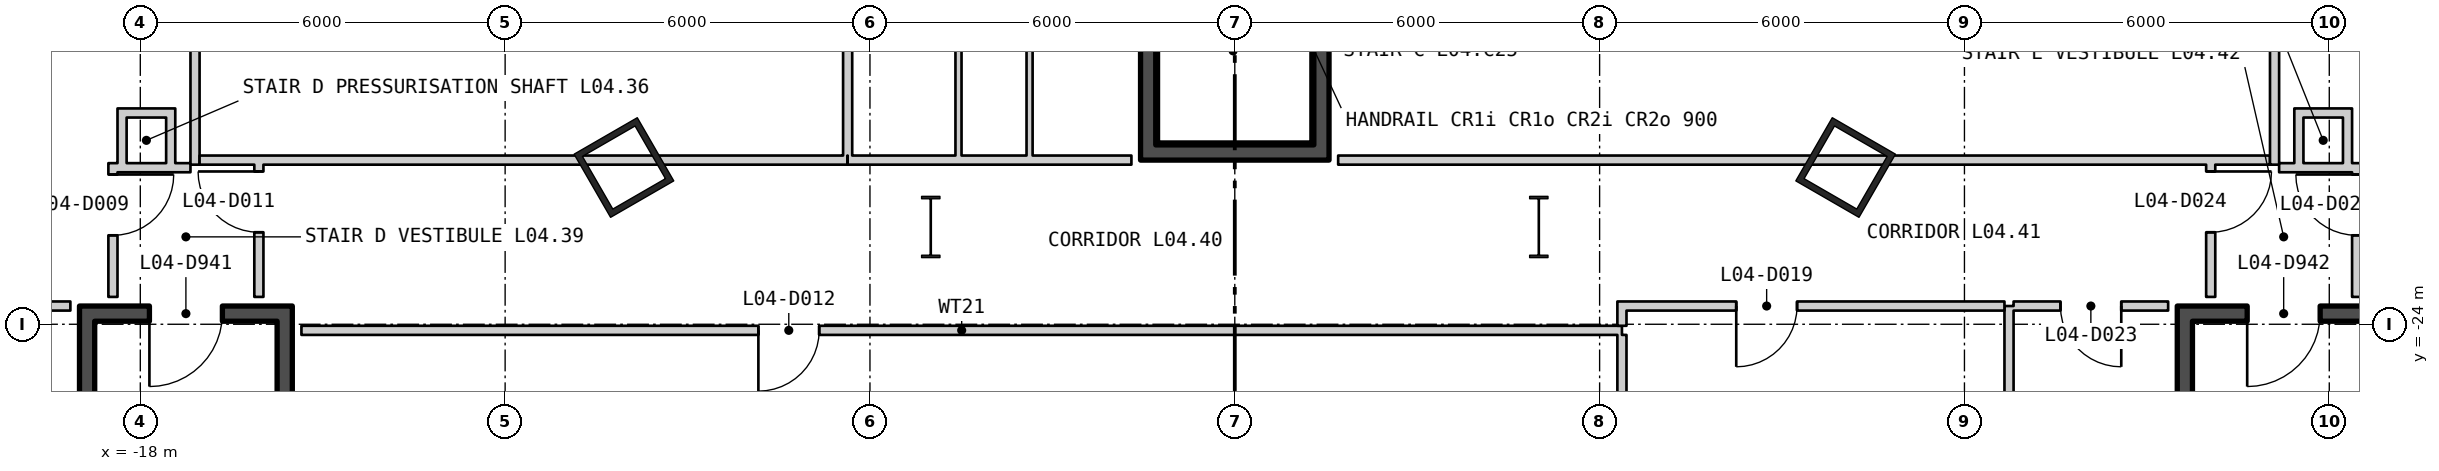
"""IFC4 building model, lengths in metres.
Left out: names, types, materials, properties, quantities, classifications, styles, units other than length and angle.
Written with IfcOpenShell. Run it as: python <this file> out.ifc"""

import sys

from ifc_helpers import new_model, si_unit, direction, frame, frame_2d, origin, origin_2d, place, context, subcontext, project, spatial, rectangle, hollow_rectangle, i_section, extrude, element, fill, save


model = new_model("IFC4")
c1 = context("Model", 3, precision=1e-05, world=origin(), true_north=direction((0.0, 1.0)))
c2 = subcontext(c1, "Body", "Model", "MODEL_VIEW")
j1 = project(units=[si_unit("LENGTHUNIT", "METRE"), si_unit("PLANEANGLEUNIT", "RADIAN")], contexts=[c1])
p1 = place(None, origin())
s1 = spatial("IfcSite", under=j1, at=p1, CompositionType="ELEMENT")
p2 = place(p1, origin())
s2 = spatial("IfcBuilding", under=s1, at=p2, CompositionType="ELEMENT")
p3 = place(p2, frame((0.0, 0.0, 23.7)))
s3 = spatial("IfcBuildingStorey", under=s2, at=p3, CompositionType="ELEMENT", Elevation=23.7)
for number, where, z_axis, x_axis in (
    (1, (-10.046, -21.422, 0.0), (0.0, 0.0, 1.0), (0.5, -0.866, 0.0)),
    (2, (10.046, -21.422, 0.0), (0.0, 0.0, 1.0), (0.5, 0.866, 0.0)),
):
    element("IfcColumn", number, at=place(p3, frame(where, z_axis=z_axis, x_axis=x_axis)), inside=s3, PredefinedType="COLUMN", context=c2, shape_type="SweptSolid", body=[
        extrude(hollow_rectangle(XDim=1.2, YDim=1.2, WallThickness=0.1, at=origin_2d()), origin(), (0.0, 0.0, 1.0), 5.1),
    ])
for number, where, z_axis, x_axis in (
    (3, (5.0, -22.4, 0.0), (0.0, 0.0, 1.0), (1.0, 0.0, 0.0)),
    (4, (-5.0, -22.4, 0.0), (0.0, 0.0, 1.0), (1.0, 0.0, 0.0)),
):
    element("IfcColumn", number, at=place(p3, frame(where, z_axis=z_axis, x_axis=x_axis)), inside=s3, PredefinedType="COLUMN", context=c2, shape_type="SweptSolid", body=[
        extrude(i_section(OverallWidth=0.302, OverallDepth=1.008, WebThickness=0.021, FlangeThickness=0.04, at=origin_2d()), origin(), (0.0, 0.0, 1.0), 5.1),
    ])
p4 = place(p3, frame((-1.425, -21.05, 0.0), z_axis=(0.0, 0.0, 1.0), x_axis=(0.0, 1.0, 0.0)))
e5 = element("IfcWall", 5, at=p4, inside=s3, PredefinedType="SHEAR", context=c2, shape_type="SweptSolid", body=[
    extrude(rectangle(XDim=7.2, YDim=0.25, at=frame_2d((3.6, 0.0))), origin(), (0.0, 0.0, 1.0), 4.85),
])
p5 = place(p3, frame((1.425, -21.05, 0.0), z_axis=(0.0, 0.0, 1.0), x_axis=(0.0, 1.0, 0.0)))
e6 = element("IfcWall", 6, at=p5, inside=s3, PredefinedType="SHEAR", context=c2, shape_type="SweptSolid", body=[
    extrude(rectangle(XDim=7.2, YDim=0.25, at=frame_2d((3.6, 0.0))), origin(), (0.0, 0.0, 1.0), 4.85),
])
p6 = place(p5, frame((5.89, 0.0, 0.0)))
e7 = element("IfcOpeningElement", 7, at=p6, cuts=e6, PredefinedType="OPENING", context=c2, shape_type="SweptSolid", body=[
    extrude(rectangle(XDim=1.0, YDim=2.1, at=frame_2d((0.5, 1.05))), frame((0.0, 0.135, 0.0), z_axis=(0.0, -1.0, 0.0), x_axis=(1.0, 0.0, 0.0)), (0.0, 0.0, 1.0), 0.27),
])
p7 = place(p3, frame((-1.55, -21.175, 0.0), z_axis=(0.0, 0.0, 1.0), x_axis=(1.0, 0.0, 0.0)))
e8 = element("IfcWall", 8, at=p7, inside=s3, PredefinedType="SHEAR", context=c2, shape_type="SweptSolid", body=[
    extrude(rectangle(XDim=3.1, YDim=0.25, at=frame_2d((1.55, 0.0))), origin(), (0.0, 0.0, 1.0), 4.85),
])
for number, where, z_axis, x_axis in (
    (9, (-18.875, -31.25, 0.0), (0.0, 0.0, 1.0), (0.0, 1.0, 0.0)),
    (10, (-15.625, -31.25, 0.0), (0.0, 0.0, 1.0), (0.0, 1.0, 0.0)),
):
    element("IfcWall", number, at=place(p3, frame(where, z_axis=z_axis, x_axis=x_axis)), inside=s3, PredefinedType="SHEAR", context=c2, shape_type="SweptSolid", body=[
        extrude(rectangle(XDim=7.3, YDim=0.25, at=frame_2d((3.65, 0.0))), origin(), (0.0, 0.0, 1.0), 4.85),
    ])
p8 = place(p3, frame((-19.0, -23.825, 0.0), z_axis=(0.0, 0.0, 1.0), x_axis=(1.0, 0.0, 0.0)))
e11 = element("IfcWall", 11, at=p8, inside=s3, PredefinedType="SHEAR", context=c2, shape_type="SweptSolid", body=[
    extrude(rectangle(XDim=3.5, YDim=0.25, at=frame_2d((1.75, 0.0))), origin(), (0.0, 0.0, 1.0), 4.85),
])
p9 = place(p8, frame((1.15, 0.0, 0.0)))
e12 = element("IfcOpeningElement", 12, at=p9, cuts=e11, PredefinedType="OPENING", context=c2, shape_type="SweptSolid", body=[
    extrude(rectangle(XDim=1.2, YDim=2.1, at=frame_2d((0.6, 1.05))), frame((0.0, 0.135, 0.0), z_axis=(0.0, -1.0, 0.0), x_axis=(1.0, 0.0, 0.0)), (0.0, 0.0, 1.0), 0.27),
])
p10 = place(p3, frame((15.625, -31.25, 0.0), z_axis=(0.0, 0.0, 1.0), x_axis=(0.0, 1.0, 0.0)))
e13 = element("IfcWall", 13, at=p10, inside=s3, PredefinedType="SHEAR", context=c2, shape_type="SweptSolid", body=[
    extrude(rectangle(XDim=7.3, YDim=0.25, at=frame_2d((3.65, 0.0))), origin(), (0.0, 0.0, 1.0), 4.85),
])
p11 = place(p3, frame((15.5, -23.825, 0.0), z_axis=(0.0, 0.0, 1.0), x_axis=(1.0, 0.0, 0.0)))
e14 = element("IfcWall", 14, at=p11, inside=s3, PredefinedType="SHEAR", context=c2, shape_type="SweptSolid", body=[
    extrude(rectangle(XDim=3.5, YDim=0.25, at=frame_2d((1.75, 0.0))), origin(), (0.0, 0.0, 1.0), 4.85),
])
p12 = place(p11, frame((1.15, 0.0, 0.0)))
e15 = element("IfcOpeningElement", 15, at=p12, cuts=e14, PredefinedType="OPENING", context=c2, shape_type="SweptSolid", body=[
    extrude(rectangle(XDim=1.2, YDim=2.1, at=frame_2d((0.6, 1.05))), frame((0.0, 0.135, 0.0), z_axis=(0.0, -1.0, 0.0), x_axis=(1.0, 0.0, 0.0)), (0.0, 0.0, 1.0), 0.27),
])
p13 = place(p3, frame((-19.825, -23.7, 0.0), z_axis=(0.0, 0.0, 1.0), x_axis=(1.0, 0.0, 0.0)))
e16 = element("IfcWall", 16, at=p13, inside=s3, PredefinedType="PARTITIONING", context=c2, shape_type="SweptSolid", body=[
    extrude(rectangle(XDim=0.675, YDim=0.15, at=frame_2d((0.338, 0.0))), origin(), (0.0, 0.0, 1.0), 4.85),
])
p14 = place(p3, frame((-18.45, -23.55, 0.0), z_axis=(0.0, 0.0, 1.0), x_axis=(0.0, 1.0, 0.0)))
e17 = element("IfcWall", 17, at=p14, inside=s3, PredefinedType="PARTITIONING", context=c2, shape_type="SweptSolid", body=[
    extrude(rectangle(XDim=2.2, YDim=0.15, at=frame_2d((1.1, 0.0))), origin(), (0.0, 0.0, 1.0), 4.85),
])
p15 = place(p14, frame((1.013, 0.0, 0.0)))
e18 = element("IfcOpeningElement", 18, at=p15, cuts=e17, PredefinedType="OPENING", context=c2, shape_type="SweptSolid", body=[
    extrude(rectangle(XDim=1.0, YDim=2.1, at=frame_2d((0.5, 1.05))), frame((0.0, 0.085, 0.0), z_axis=(0.0, -1.0, 0.0), x_axis=(1.0, 0.0, 0.0)), (0.0, 0.0, 1.0), 0.17),
])
p16 = place(p3, frame((-18.3, -21.5, 0.0), z_axis=(0.0, 0.0, 1.0), x_axis=(0.0, 1.0, 0.0)))
e19 = element("IfcWall", 19, at=p16, inside=s3, PredefinedType="PARTITIONING", context=c2, shape_type="SweptSolid", body=[
    extrude(rectangle(XDim=1.05, YDim=0.15, at=frame_2d((0.525, 0.0))), origin(), (0.0, 0.0, 1.0), 4.85),
])
for number, where, z_axis, x_axis in (
    (20, (-18.225, -21.425, 0.0), (0.0, 0.0, 1.0), (1.0, 0.0, 0.0)),
    (21, (-18.225, -20.525, 0.0), (0.0, 0.0, 1.0), (1.0, 0.0, 0.0)),
):
    element("IfcWall", number, at=place(p3, frame(where, z_axis=z_axis, x_axis=x_axis)), inside=s3, PredefinedType="PARTITIONING", context=c2, shape_type="SweptSolid", body=[
        extrude(rectangle(XDim=0.65, YDim=0.15, at=frame_2d((0.325, 0.0))), origin(), (0.0, 0.0, 1.0), 4.85),
    ])
p17 = place(p3, frame((-17.5, -21.5, 0.0), z_axis=(0.0, 0.0, 1.0), x_axis=(0.0, 1.0, 0.0)))
e22 = element("IfcWall", 22, at=p17, inside=s3, PredefinedType="PARTITIONING", context=c2, shape_type="SweptSolid", body=[
    extrude(rectangle(XDim=1.05, YDim=0.15, at=frame_2d((0.525, 0.0))), origin(), (0.0, 0.0, 1.0), 4.85),
])
p18 = place(p3, frame((-17.425, -21.425, 0.0), z_axis=(0.0, 0.0, 1.0), x_axis=(1.0, 0.0, 0.0)))
e23 = element("IfcWall", 23, at=p18, inside=s3, PredefinedType="PARTITIONING", context=c2, shape_type="SweptSolid", body=[
    extrude(rectangle(XDim=0.25, YDim=0.15, at=frame_2d((0.125, 0.0))), origin(), (0.0, 0.0, 1.0), 4.85),
])
p19 = place(p3, frame((-17.1, -21.375, 0.0), z_axis=(0.0, 0.0, 1.0), x_axis=(0.0, 1.0, 0.0)))
e24 = element("IfcWall", 24, at=p19, inside=s3, PredefinedType="PARTITIONING", context=c2, shape_type="SweptSolid", body=[
    extrude(rectangle(XDim=19.05, YDim=0.15, at=frame_2d((9.525, 0.0))), origin(), (0.0, 0.0, 1.0), 4.85),
])
p20 = place(p3, frame((-17.025, -21.3, 0.0), z_axis=(0.0, 0.0, 1.0), x_axis=(1.0, 0.0, 0.0)))
e25 = element("IfcWall", 25, at=p20, inside=s3, PredefinedType="PARTITIONING", context=c2, shape_type="SweptSolid", body=[
    extrude(rectangle(XDim=10.654, YDim=0.15, at=frame_2d((5.327, 0.0))), origin(), (0.0, 0.0, 1.0), 4.85),
])
p21 = place(p3, frame((-16.05, -23.55, 0.0), z_axis=(0.0, 0.0, 1.0), x_axis=(0.0, 1.0, 0.0)))
e26 = element("IfcWall", 26, at=p21, inside=s3, PredefinedType="PARTITIONING", context=c2, shape_type="SweptSolid", body=[
    extrude(rectangle(XDim=2.175, YDim=0.15, at=frame_2d((1.087, 0.0))), origin(), (0.0, 0.0, 1.0), 4.16),
])
p22 = place(p21, frame((1.063, 0.0, 0.0)))
e27 = element("IfcOpeningElement", 27, at=p22, cuts=e26, PredefinedType="OPENING", context=c2, shape_type="SweptSolid", body=[
    extrude(rectangle(XDim=1.0, YDim=2.1, at=frame_2d((0.5, 1.05))), frame((0.0, 0.085, 0.0), z_axis=(0.0, -1.0, 0.0), x_axis=(1.0, 0.0, 0.0)), (0.0, 0.0, 1.0), 0.17),
])
p23 = place(p3, frame((-15.35, -24.1, 0.0), z_axis=(0.0, 0.0, 1.0), x_axis=(1.0, 0.0, 0.0)))
e28 = element("IfcWall", 28, at=p23, inside=s3, PredefinedType="PARTITIONING", context=c2, shape_type="SweptSolid", body=[
    extrude(rectangle(XDim=21.717, YDim=0.15, at=frame_2d((10.858, 0.0))), origin(), (0.0, 0.0, 1.0), 4.85),
])
p24 = place(p23, frame((7.515, 0.0, 0.0)))
e29 = element("IfcOpeningElement", 29, at=p24, cuts=e28, PredefinedType="OPENING", context=c2, shape_type="SweptSolid", body=[
    extrude(rectangle(XDim=1.0, YDim=2.1, at=frame_2d((0.5, 1.05))), frame((0.0, 0.085, 0.0), z_axis=(0.0, -1.0, 0.0), x_axis=(1.0, 0.0, 0.0)), (0.0, 0.0, 1.0), 0.17),
])
p25 = place(p3, frame((-6.367, -21.3, 0.0), z_axis=(0.0, 0.0, 1.0), x_axis=(1.0, 0.0, 0.0)))
e30 = element("IfcWall", 30, at=p25, inside=s3, PredefinedType="PARTITIONING", context=c2, shape_type="SweptSolid", body=[
    extrude(rectangle(XDim=4.667, YDim=0.15, at=frame_2d((2.333, 0.0))), origin(), (0.0, 0.0, 1.0), 4.85),
])
p26 = place(p3, frame((-6.367, -21.225, 0.0), z_axis=(0.0, 0.0, 1.0), x_axis=(0.0, 1.0, 0.0)))
e31 = element("IfcWall", 31, at=p26, inside=s3, PredefinedType="PARTITIONING", context=c2, shape_type="SweptSolid", body=[
    extrude(rectangle(XDim=7.621, YDim=0.15, at=frame_2d((3.811, 0.0))), origin(), (0.0, 0.0, 1.0), 4.25),
])
for number, where, z_axis, x_axis in (
    (32, (-4.544, -21.225, 0.0), (0.0, 0.0, 1.0), (0.0, 1.0, 0.0)),
    (33, (-3.375, -21.225, 0.0), (0.0, 0.0, 1.0), (0.0, 1.0, 0.0)),
):
    element("IfcWall", number, at=place(p3, frame(where, z_axis=z_axis, x_axis=x_axis)), inside=s3, PredefinedType="PARTITIONING", context=c2, shape_type="SweptSolid", body=[
        extrude(rectangle(XDim=7.55, YDim=0.1, at=frame_2d((3.775, 0.0))), origin(), (0.0, 0.0, 1.0), 4.85),
    ])
p27 = place(p3, frame((1.7, -21.3, 0.0), z_axis=(0.0, 0.0, 1.0), x_axis=(1.0, 0.0, 0.0)))
e34 = element("IfcWall", 34, at=p27, inside=s3, PredefinedType="PARTITIONING", context=c2, shape_type="SweptSolid", body=[
    extrude(rectangle(XDim=15.325, YDim=0.15, at=frame_2d((7.662, 0.0))), origin(), (0.0, 0.0, 1.0), 4.85),
])
p28 = place(p3, frame((6.367, -27.441, 0.0), z_axis=(0.0, 0.0, 1.0), x_axis=(0.000122473973, 0.9999999925, 0.0)))
e35 = element("IfcWall", 35, at=p28, inside=s3, PredefinedType="PARTITIONING", context=c2, shape_type="SweptSolid", body=[
    extrude(rectangle(XDim=3.266, YDim=0.15, at=frame_2d((1.633, 0.0))), origin(), (0.0, 0.0, 1.0), 4.25),
])
p29 = place(p3, frame((6.367, -24.025, 0.0), z_axis=(0.0, 0.0, 1.0), x_axis=(0.0, 1.0, 0.0)))
e36 = element("IfcWall", 36, at=p29, inside=s3, PredefinedType="PARTITIONING", context=c2, shape_type="SweptSolid", body=[
    extrude(rectangle(XDim=0.4, YDim=0.15, at=frame_2d((0.2, 0.0))), origin(), (0.0, 0.0, 1.0), 4.85),
])
p30 = place(p3, frame((6.442, -23.7, 0.0), z_axis=(0.0, 0.0, 1.0), x_axis=(1.0, 0.0, 0.0)))
e37 = element("IfcWall", 37, at=p30, inside=s3, PredefinedType="PARTITIONING", context=c2, shape_type="SweptSolid", body=[
    extrude(rectangle(XDim=6.216, YDim=0.15, at=frame_2d((3.108, 0.0))), origin(), (0.0, 0.0, 1.0), 4.85),
])
p31 = place(p30, frame((1.805, 0.0, 0.0)))
e38 = element("IfcOpeningElement", 38, at=p31, cuts=e37, PredefinedType="OPENING", context=c2, shape_type="SweptSolid", body=[
    extrude(rectangle(XDim=1.0, YDim=2.1, at=frame_2d((0.5, 1.05))), frame((0.0, 0.085, 0.0), z_axis=(0.0, -1.0, 0.0), x_axis=(1.0, 0.0, 0.0)), (0.0, 0.0, 1.0), 0.17),
])
p32 = place(p3, frame((12.733, -32.9, 0.0), z_axis=(0.0, 0.0, 1.0), x_axis=(0.0, 1.0, 0.0)))
e39 = element("IfcWall", 39, at=p32, inside=s3, PredefinedType="PARTITIONING", context=c2, shape_type="SweptSolid", body=[
    extrude(rectangle(XDim=9.2, YDim=0.15, at=frame_2d((4.6, 0.0))), origin(), (0.0, 0.0, 1.0), 4.16),
])
p33 = place(p3, frame((12.808, -23.7, 0.0), z_axis=(0.0, 0.0, 1.0), x_axis=(1.0, 0.0, 0.0)))
e40 = element("IfcWall", 40, at=p33, inside=s3, PredefinedType="PARTITIONING", context=c2, shape_type="SweptSolid", body=[
    extrude(rectangle(XDim=2.542, YDim=0.15, at=frame_2d((1.271, 0.0))), origin(), (0.0, 0.0, 1.0), 4.85),
])
p34 = place(p33, frame((0.771, 0.0, 0.0)))
e41 = element("IfcOpeningElement", 41, at=p34, cuts=e40, PredefinedType="OPENING", context=c2, shape_type="SweptSolid", body=[
    extrude(rectangle(XDim=1.0, YDim=2.1, at=frame_2d((0.5, 1.05))), frame((0.0, 0.085, 0.0), z_axis=(0.0, -1.0, 0.0), x_axis=(1.0, 0.0, 0.0)), (0.0, 0.0, 1.0), 0.17),
])
p35 = place(p3, frame((16.05, -23.55, 0.0), z_axis=(0.0, 0.0, 1.0), x_axis=(0.0, 1.0, 0.0)))
e42 = element("IfcWall", 42, at=p35, inside=s3, PredefinedType="PARTITIONING", context=c2, shape_type="SweptSolid", body=[
    extrude(rectangle(XDim=2.175, YDim=0.15, at=frame_2d((1.087, 0.0))), origin(), (0.0, 0.0, 1.0), 4.16),
])
p36 = place(p35, frame((1.063, 0.0, 0.0)))
e43 = element("IfcOpeningElement", 43, at=p36, cuts=e42, PredefinedType="OPENING", context=c2, shape_type="SweptSolid", body=[
    extrude(rectangle(XDim=1.0, YDim=2.1, at=frame_2d((0.5, 1.05))), frame((0.0, 0.085, 0.0), z_axis=(0.0, -1.0, 0.0), x_axis=(1.0, 0.0, 0.0)), (0.0, 0.0, 1.0), 0.17),
])
p37 = place(p3, frame((17.1, -21.375, 0.0), z_axis=(0.0, 0.0, 1.0), x_axis=(0.0, 1.0, 0.0)))
e44 = element("IfcWall", 44, at=p37, inside=s3, PredefinedType="PARTITIONING", context=c2, shape_type="SweptSolid", body=[
    extrude(rectangle(XDim=19.05, YDim=0.15, at=frame_2d((9.525, 0.0))), origin(), (0.0, 0.0, 1.0), 4.85),
])
p38 = place(p37, frame((4.963, 0.0, 0.0)))
e45 = element("IfcOpeningElement", 45, at=p38, cuts=e44, PredefinedType="OPENING", context=c2, shape_type="SweptSolid", body=[
    extrude(rectangle(XDim=1.0, YDim=2.1, at=frame_2d((0.5, 1.05))), frame((0.0, 0.085, 0.0), z_axis=(0.0, -1.0, 0.0), x_axis=(1.0, 0.0, 0.0)), (0.0, 0.0, 1.0), 0.17),
])
p39 = place(p3, frame((17.175, -21.425, 0.0), z_axis=(0.0, 0.0, 1.0), x_axis=(1.0, 0.0, 0.0)))
e46 = element("IfcWall", 46, at=p39, inside=s3, PredefinedType="PARTITIONING", context=c2, shape_type="SweptSolid", body=[
    extrude(rectangle(XDim=0.25, YDim=0.15, at=frame_2d((0.125, 0.0))), origin(), (0.0, 0.0, 1.0), 4.85),
])
p40 = place(p3, frame((17.5, -21.5, 0.0), z_axis=(0.0, 0.0, 1.0), x_axis=(0.0, 1.0, 0.0)))
e47 = element("IfcWall", 47, at=p40, inside=s3, PredefinedType="PARTITIONING", context=c2, shape_type="SweptSolid", body=[
    extrude(rectangle(XDim=1.05, YDim=0.15, at=frame_2d((0.525, 0.0))), origin(), (0.0, 0.0, 1.0), 4.85),
])
for number, where, z_axis, x_axis in (
    (48, (17.575, -21.425, 0.0), (0.0, 0.0, 1.0), (1.0, 0.0, 0.0)),
    (49, (17.575, -20.525, 0.0), (0.0, 0.0, 1.0), (1.0, 0.0, 0.0)),
):
    element("IfcWall", number, at=place(p3, frame(where, z_axis=z_axis, x_axis=x_axis)), inside=s3, PredefinedType="PARTITIONING", context=c2, shape_type="SweptSolid", body=[
        extrude(rectangle(XDim=0.65, YDim=0.15, at=frame_2d((0.325, 0.0))), origin(), (0.0, 0.0, 1.0), 4.85),
    ])
p41 = place(p3, frame((18.3, -21.5, 0.0), z_axis=(0.0, 0.0, 1.0), x_axis=(0.0, 1.0, 0.0)))
e50 = element("IfcWall", 50, at=p41, inside=s3, PredefinedType="PARTITIONING", context=c2, shape_type="SweptSolid", body=[
    extrude(rectangle(XDim=1.05, YDim=0.15, at=frame_2d((0.525, 0.0))), origin(), (0.0, 0.0, 1.0), 4.85),
])
p42 = place(p3, frame((18.45, -23.55, 0.0), z_axis=(0.0, 0.0, 1.0), x_axis=(0.0, 1.0, 0.0)))
e51 = element("IfcWall", 51, at=p42, inside=s3, PredefinedType="PARTITIONING", context=c2, shape_type="SweptSolid", body=[
    extrude(rectangle(XDim=2.2, YDim=0.15, at=frame_2d((1.1, 0.0))), origin(), (0.0, 0.0, 1.0), 4.85),
])
p43 = place(p42, frame((1.013, 0.0, 0.0)))
e52 = element("IfcOpeningElement", 52, at=p43, cuts=e51, PredefinedType="OPENING", context=c2, shape_type="SweptSolid", body=[
    extrude(rectangle(XDim=1.0, YDim=2.1, at=frame_2d((0.5, 1.05))), frame((0.0, 0.085, 0.0), z_axis=(0.0, -1.0, 0.0), x_axis=(1.0, 0.0, 0.0)), (0.0, 0.0, 1.0), 0.17),
])
p44 = place(p9, origin())
e53 = element("IfcDoor", 53, at=p44, inside=s3, OperationType="SINGLE_SWING_LEFT", PredefinedType="DOOR", context=c2, shape_type="SweptSolid", body=[
    extrude(rectangle(XDim=1.2, YDim=2.1, at=frame_2d((0.6, 1.05))), frame((0.0, 0.025, 0.0), z_axis=(0.0, -1.0, 0.0), x_axis=(1.0, 0.0, 0.0)), (0.0, 0.0, 1.0), 0.05),
])
fill(e12, e53)
p45 = place(p12, origin())
e54 = element("IfcDoor", 54, at=p45, inside=s3, OperationType="SINGLE_SWING_LEFT", PredefinedType="DOOR", context=c2, shape_type="SweptSolid", body=[
    extrude(rectangle(XDim=1.2, YDim=2.1, at=frame_2d((0.6, 1.05))), frame((0.0, 0.025, 0.0), z_axis=(0.0, -1.0, 0.0), x_axis=(1.0, 0.0, 0.0)), (0.0, 0.0, 1.0), 0.05),
])
fill(e15, e54)
p46 = place(p15, origin())
e55 = element("IfcDoor", 55, at=p46, inside=s3, OperationType="SINGLE_SWING_RIGHT", PredefinedType="DOOR", context=c2, shape_type="SweptSolid", body=[
    extrude(rectangle(XDim=1.0, YDim=2.1, at=frame_2d((0.5, 1.05))), frame((0.0, 0.025, 0.0), z_axis=(0.0, -1.0, 0.0), x_axis=(1.0, 0.0, 0.0)), (0.0, 0.0, 1.0), 0.05),
])
fill(e18, e55)
p47 = place(p22, origin())
e56 = element("IfcDoor", 56, at=p47, inside=s3, OperationType="SINGLE_SWING_LEFT", PredefinedType="DOOR", context=c2, shape_type="SweptSolid", body=[
    extrude(rectangle(XDim=1.0, YDim=2.1, at=frame_2d((0.5, 1.05))), frame((0.0, 0.025, 0.0), z_axis=(0.0, -1.0, 0.0), x_axis=(1.0, 0.0, 0.0)), (0.0, 0.0, 1.0), 0.05),
])
fill(e27, e56)
p48 = place(p24, origin())
e57 = element("IfcDoor", 57, at=p48, inside=s3, OperationType="SINGLE_SWING_LEFT", PredefinedType="DOOR", context=c2, shape_type="SweptSolid", body=[
    extrude(rectangle(XDim=1.0, YDim=2.1, at=frame_2d((0.5, 1.05))), frame((0.0, 0.025, 0.0), z_axis=(0.0, -1.0, 0.0), x_axis=(1.0, 0.0, 0.0)), (0.0, 0.0, 1.0), 0.05),
])
fill(e29, e57)
p49 = place(p31, origin())
e58 = element("IfcDoor", 58, at=p49, inside=s3, OperationType="SINGLE_SWING_LEFT", PredefinedType="DOOR", context=c2, shape_type="SweptSolid", body=[
    extrude(rectangle(XDim=1.0, YDim=2.1, at=frame_2d((0.5, 1.05))), frame((0.0, 0.025, 0.0), z_axis=(0.0, -1.0, 0.0), x_axis=(1.0, 0.0, 0.0)), (0.0, 0.0, 1.0), 0.05),
])
fill(e38, e58)
p50 = place(p34, origin())
e59 = element("IfcDoor", 59, at=p50, inside=s3, OperationType="SINGLE_SWING_RIGHT", PredefinedType="DOOR", context=c2, shape_type="SweptSolid", body=[
    extrude(rectangle(XDim=1.0, YDim=2.1, at=frame_2d((0.5, 1.05))), frame((0.0, 0.025, 0.0), z_axis=(0.0, -1.0, 0.0), x_axis=(1.0, 0.0, 0.0)), (0.0, 0.0, 1.0), 0.05),
])
fill(e41, e59)
p51 = place(p36, origin())
e60 = element("IfcDoor", 60, at=p51, inside=s3, OperationType="SINGLE_SWING_RIGHT", PredefinedType="DOOR", context=c2, shape_type="SweptSolid", body=[
    extrude(rectangle(XDim=1.0, YDim=2.1, at=frame_2d((0.5, 1.05))), frame((0.0, 0.025, 0.0), z_axis=(0.0, -1.0, 0.0), x_axis=(1.0, 0.0, 0.0)), (0.0, 0.0, 1.0), 0.05),
])
fill(e43, e60)
p52 = place(p43, origin())
e61 = element("IfcDoor", 61, at=p52, inside=s3, OperationType="SINGLE_SWING_LEFT", PredefinedType="DOOR", context=c2, shape_type="SweptSolid", body=[
    extrude(rectangle(XDim=1.0, YDim=2.1, at=frame_2d((0.5, 1.05))), frame((0.0, 0.025, 0.0), z_axis=(0.0, -1.0, 0.0), x_axis=(1.0, 0.0, 0.0)), (0.0, 0.0, 1.0), 0.05),
])
fill(e52, e61)
save(model, sys.argv[1])
